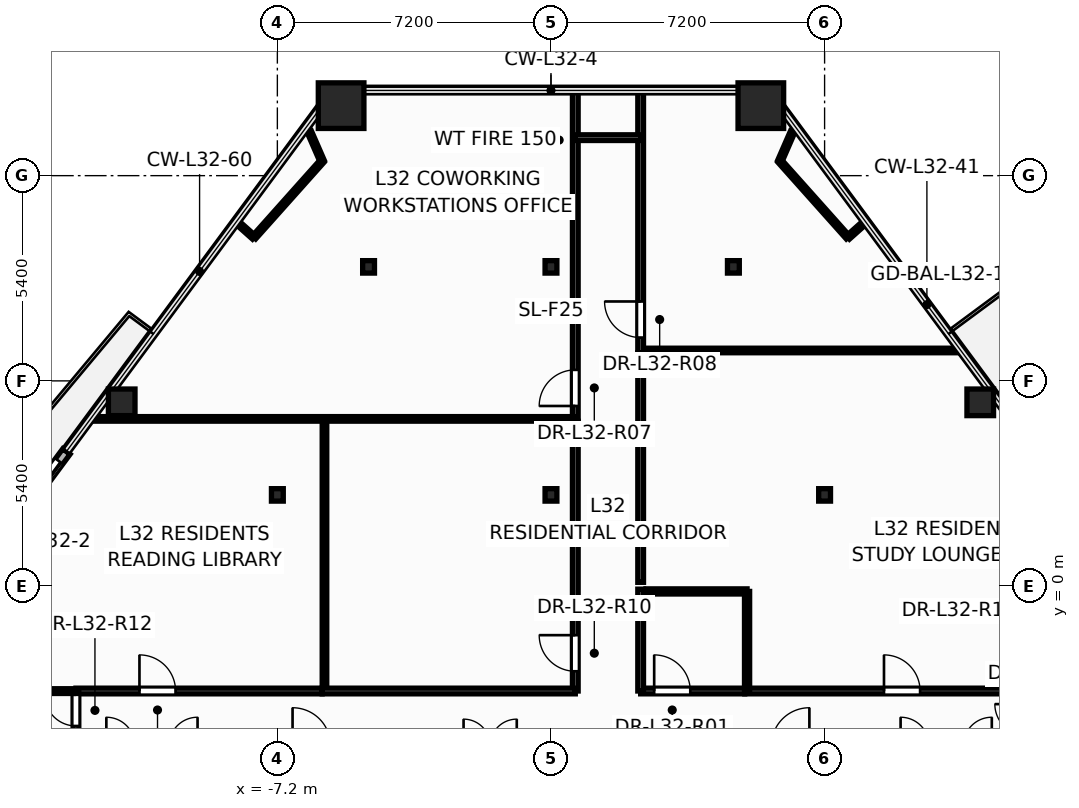
"""IFC4 building model, lengths in metres.
Left out: names, types, materials, properties, quantities, classifications, styles, units other than length and angle.
Written with IfcOpenShell. Run it as: python <this file> out.ifc"""

import sys

from ifc_helpers import new_model, si_unit, direction, frame, frame_2d, origin, origin_2d, place, context, subcontext, project, spatial, rectangle, hollow_rectangle, hollow_circle, i_section, extrude, element, fill, save


model = new_model("IFC4")
c1 = context("Model", 3, precision=1e-05, world=origin(), true_north=direction((0.0, 1.0)))
c2 = subcontext(c1, "Body", "Model", "MODEL_VIEW")
j1 = project(units=[si_unit("LENGTHUNIT", "METRE"), si_unit("PLANEANGLEUNIT", "RADIAN")], contexts=[c1])
p1 = place(None, origin())
s1 = spatial("IfcSite", under=j1, at=p1, CompositionType="ELEMENT")
p2 = place(p1, origin())
s2 = spatial("IfcBuilding", under=s1, at=p2, CompositionType="ELEMENT")
p3 = place(p2, frame((0.0, 0.0, 125.7)))
s3 = spatial("IfcBuildingStorey", under=s2, at=p3, CompositionType="ELEMENT", Elevation=125.7)
for number, where, z_axis, x_axis in (
    (1, (5.522, 12.642, 0.0), (0.0, 0.0, 1.0), (1.0, 0.0, 0.0)),
    (2, (-5.522, 12.642, 0.0), (0.0, 0.0, 1.0), (1.0, 0.0, 0.0)),
):
    element("IfcColumn", number, at=place(p3, frame(where, z_axis=z_axis, x_axis=x_axis)), inside=s3, PredefinedType="COLUMN", context=c2, shape_type="SweptSolid", body=[
        extrude(hollow_rectangle(XDim=1.2, YDim=1.2, WallThickness=0.055, at=origin_2d()), origin(), (0.0, 0.0, 1.0), 3.6),
    ])
for number, where, z_axis, x_axis in (
    (3, (11.296, 4.836, 0.0), (0.0, 0.0, 1.0), (1.0, 0.0, 0.0)),
    (4, (-11.296, 4.836, 0.0), (0.0, 0.0, 1.0), (1.0, 0.0, 0.0)),
):
    element("IfcColumn", number, at=place(p3, frame(where, z_axis=z_axis, x_axis=x_axis)), inside=s3, PredefinedType="COLUMN", context=c2, shape_type="SweptSolid", body=[
        extrude(hollow_circle(Radius=0.35, WallThickness=0.03, at=origin_2d()), origin(), (0.0, 0.0, 1.0), 3.6),
    ])
for number, where, z_axis, x_axis in (
    (5, (-7.2, 2.4, 0.0), (0.0, 0.0, 1.0), (1.0, 0.0, 0.0)),
    (6, (0.0, 2.4, 0.0), (0.0, 0.0, 1.0), (1.0, 0.0, 0.0)),
    (7, (7.2, 2.4, 0.0), (0.0, 0.0, 1.0), (1.0, 0.0, 0.0)),
    (8, (-4.8, 8.4, 0.0), (0.0, 0.0, 1.0), (1.0, 0.0, 0.0)),
    (9, (0.0, 8.4, 0.0), (0.0, 0.0, 1.0), (1.0, 0.0, 0.0)),
    (10, (4.8, 8.4, 0.0), (0.0, 0.0, 1.0), (1.0, 0.0, 0.0)),
):
    element("IfcColumn", number, at=place(p3, frame(where, z_axis=z_axis, x_axis=x_axis)), inside=s3, PredefinedType="COLUMN", context=c2, shape_type="SweptSolid", body=[
        extrude(i_section(OverallWidth=0.311, OverallDepth=0.327, WebThickness=0.016, FlangeThickness=0.025, at=origin_2d()), origin(), (0.0, 0.0, 1.0), 3.6),
    ])
p4 = place(p3, frame((-12.751, 3.541, -0.015), z_axis=(0.0, 0.0, 1.0), x_axis=(-0.594638042479, -0.80399353134, 0.0)))
e11 = element("IfcWall", 11, at=p4, inside=s3, PredefinedType="STANDARD", context=c2, shape_type="SweptSolid", body=[
    extrude(rectangle(XDim=2.14, YDim=0.24, at=frame_2d((1.07, 0.0))), origin(), (0.0, 0.0, 1.0), 2.807),
])
p5 = place(p4, frame((0.32, 0.0, 0.015)))
e12 = element("IfcOpeningElement", 12, at=p5, cuts=e11, PredefinedType="OPENING", context=c2, shape_type="SweptSolid", body=[
    extrude(rectangle(XDim=1.506, YDim=2.204, at=frame_2d((0.75, 1.102))), frame((0.0, 0.13, 0.0), z_axis=(0.0, -1.0, 0.0), x_axis=(1.0, 0.0, 0.0)), (0.0, 0.0, 1.0), 0.26),
])
p6 = place(p3, frame((0.64, 4.34, 0.0), z_axis=(0.0, 0.0, 1.0), x_axis=(0.0, 1.0, 0.0)))
e13 = element("IfcWall", 13, at=p6, inside=s3, PredefinedType="PARTITIONING", context=c2, shape_type="SweptSolid", body=[
    extrude(rectangle(XDim=8.702, YDim=0.15, at=frame_2d((4.351, 0.0))), origin(), (0.0, 0.0, 1.0), 2.325),
])
p7 = place(p6, frame((0.4, 0.0, 0.0)))
e14 = element("IfcOpeningElement", 14, at=p7, cuts=e13, PredefinedType="OPENING", context=c2, shape_type="SweptSolid", body=[
    extrude(rectangle(XDim=0.956, YDim=2.104, at=frame_2d((0.475, 1.052))), frame((0.0, 0.085, 0.0), z_axis=(0.0, -1.0, 0.0), x_axis=(1.0, 0.0, 0.0)), (0.0, 0.0, 1.0), 0.17),
])
p8 = place(p3, frame((2.36, 6.2, 0.0), z_axis=(0.0, 0.0, 1.0), x_axis=(1.0, 0.0, 0.0)))
e15 = element("IfcWall", 15, at=p8, inside=s3, PredefinedType="PARTITIONING", context=c2, shape_type="SweptSolid", body=[
    extrude(rectangle(XDim=8.424, YDim=0.12, at=frame_2d((4.212, 0.0))), origin(), (0.0, 0.0, 1.0), 2.325),
])
p9 = place(p3, frame((5.1, -2.76, 0.0), z_axis=(0.0, 0.0, 1.0), x_axis=(1.0, 0.0, 0.0)))
e16 = element("IfcWall", 16, at=p9, inside=s3, PredefinedType="PARTITIONING", context=c2, shape_type="SweptSolid", body=[
    extrude(rectangle(XDim=7.4, YDim=0.15, at=frame_2d((3.7, 0.0))), origin(), (0.0, 0.0, 1.0), 2.325),
])
p10 = place(p9, frame((3.663, 0.0, 0.0)))
e17 = element("IfcOpeningElement", 17, at=p10, cuts=e16, PredefinedType="OPENING", context=c2, shape_type="SweptSolid", body=[
    extrude(rectangle(XDim=0.956, YDim=2.104, at=frame_2d((0.475, 1.052))), frame((0.0, 0.085, 0.0), z_axis=(0.0, -1.0, 0.0), x_axis=(1.0, 0.0, 0.0)), (0.0, 0.0, 1.0), 0.17),
])
p11 = place(p3, frame((0.64, -2.76, 0.0), z_axis=(0.0, 0.0, 1.0), x_axis=(0.0, 1.0, 0.0)))
e18 = element("IfcWall", 18, at=p11, inside=s3, PredefinedType="PARTITIONING", context=c2, shape_type="SweptSolid", body=[
    extrude(rectangle(XDim=7.098, YDim=0.15, at=frame_2d((3.549, 0.0))), origin(), (0.0, 0.0, 1.0), 2.325),
])
p12 = place(p11, frame((0.519, 0.0, 0.0)))
e19 = element("IfcOpeningElement", 19, at=p12, cuts=e18, PredefinedType="OPENING", context=c2, shape_type="SweptSolid", body=[
    extrude(rectangle(XDim=0.956, YDim=2.104, at=frame_2d((0.475, 1.052))), frame((0.0, 0.085, 0.0), z_axis=(0.0, -1.0, 0.0), x_axis=(1.0, 0.0, 0.0)), (0.0, 0.0, 1.0), 0.17),
])
p13 = place(p3, frame((-5.96, -2.76, 0.0), z_axis=(0.0, 0.0, 1.0), x_axis=(0.0, 1.0, 0.0)))
e20 = element("IfcWall", 20, at=p13, inside=s3, PredefinedType="PARTITIONING", context=c2, shape_type="SweptSolid", body=[
    extrude(rectangle(XDim=7.16, YDim=0.12, at=frame_2d((3.58, 0.0))), origin(), (0.0, 0.0, 1.0), 2.325),
])
p14 = place(p3, frame((2.36, 6.14, 0.0), z_axis=(0.0, 0.0, 1.0), x_axis=(0.0, 1.0, 0.0)))
e21 = element("IfcWall", 21, at=p14, inside=s3, PredefinedType="PARTITIONING", context=c2, shape_type="SweptSolid", body=[
    extrude(rectangle(XDim=6.902, YDim=0.15, at=frame_2d((3.451, 0.0))), origin(), (0.0, 0.0, 1.0), 2.325),
])
p15 = place(p14, frame((0.399, 0.0, 0.0)))
e22 = element("IfcOpeningElement", 22, at=p15, cuts=e21, PredefinedType="OPENING", context=c2, shape_type="SweptSolid", body=[
    extrude(rectangle(XDim=0.956, YDim=2.104, at=frame_2d((0.475, 1.052))), frame((0.0, 0.085, 0.0), z_axis=(0.0, -1.0, 0.0), x_axis=(1.0, 0.0, 0.0)), (0.0, 0.0, 1.0), 0.17),
])
p16 = place(p3, frame((-6.02, -2.76, 0.0), z_axis=(0.0, 0.0, 1.0), x_axis=(1.0, 0.0, 0.0)))
e23 = element("IfcWall", 23, at=p16, inside=s3, PredefinedType="PARTITIONING", context=c2, shape_type="SweptSolid", body=[
    extrude(rectangle(XDim=6.66, YDim=0.15, at=frame_2d((3.33, 0.0))), origin(), (0.0, 0.0, 1.0), 2.325),
])
p17 = place(p3, frame((-12.116, 4.4, 0.0), z_axis=(0.0, 0.0, 1.0), x_axis=(1.0, 0.0, 0.0)))
e24 = element("IfcWall", 24, at=p17, inside=s3, PredefinedType="PARTITIONING", context=c2, shape_type="SweptSolid", body=[
    extrude(rectangle(XDim=12.756, YDim=0.12, at=frame_2d((6.378, 0.0))), origin(), (0.0, 0.0, 1.0), 2.325),
])
p18 = place(p3, frame((-12.5, -2.76, 0.0), z_axis=(0.0, 0.0, 1.0), x_axis=(1.0, 0.0, 0.0)))
e25 = element("IfcWall", 25, at=p18, inside=s3, PredefinedType="PARTITIONING", context=c2, shape_type="SweptSolid", body=[
    extrude(rectangle(XDim=6.478, YDim=0.15, at=frame_2d((3.239, 0.0))), origin(), (0.0, 0.0, 1.0), 2.325),
])
p19 = place(p18, frame((1.671, 0.0, 0.0)))
e26 = element("IfcOpeningElement", 26, at=p19, cuts=e25, PredefinedType="OPENING", context=c2, shape_type="SweptSolid", body=[
    extrude(rectangle(XDim=0.956, YDim=2.104, at=frame_2d((0.475, 1.052))), frame((0.0, 0.085, 0.0), z_axis=(0.0, -1.0, 0.0), x_axis=(1.0, 0.0, 0.0)), (0.0, 0.0, 1.0), 0.17),
])
p20 = place(p3, frame((2.36, 0.1, 0.0), z_axis=(0.0, 0.0, 1.0), x_axis=(0.0, 1.0, 0.0)))
e27 = element("IfcWall", 27, at=p20, inside=s3, PredefinedType="PARTITIONING", context=c2, shape_type="SweptSolid", body=[
    extrude(rectangle(XDim=6.038, YDim=0.15, at=frame_2d((3.019, 0.0))), origin(), (0.0, 0.0, 1.0), 2.325),
])
p21 = place(p3, frame((-17.411, -2.76, 0.0), z_axis=(0.0, 0.0, 1.0), x_axis=(1.0, 0.0, 0.0)))
e28 = element("IfcWall", 28, at=p21, inside=s3, PredefinedType="PARTITIONING", context=c2, shape_type="SweptSolid", body=[
    extrude(rectangle(XDim=4.971, YDim=0.12, at=frame_2d((2.486, 0.0))), origin(), (0.0, 0.0, 1.0), 2.792),
])
p22 = place(p3, frame((2.36, -2.76, 0.0), z_axis=(0.0, 0.0, 1.0), x_axis=(1.0, 0.0, 0.0)))
e29 = element("IfcWall", 29, at=p22, inside=s3, PredefinedType="PARTITIONING", context=c2, shape_type="SweptSolid", body=[
    extrude(rectangle(XDim=2.738, YDim=0.15, at=frame_2d((1.369, 0.0))), origin(), (0.0, 0.0, 1.0), 2.919),
])
p23 = place(p22, frame((0.356, 0.0, 0.0)))
e30 = element("IfcOpeningElement", 30, at=p23, cuts=e29, PredefinedType="OPENING", context=c2, shape_type="SweptSolid", body=[
    extrude(rectangle(XDim=0.956, YDim=2.104, at=frame_2d((0.475, 1.052))), frame((0.0, 0.085, 0.0), z_axis=(0.0, -1.0, 0.0), x_axis=(1.0, 0.0, 0.0)), (0.0, 0.0, 1.0), 0.17),
])
for number, where, z_axis, x_axis in (
    (31, (-6.022, 11.184, 0.0), (0.0, 0.0, 1.0), (-0.666, -0.746, 0.0)),
    (32, (7.815, 9.175, 0.0), (0.0, 0.0, 1.0), (-0.666, 0.746, 0.0)),
):
    element("IfcWall", number, at=place(p3, frame(where, z_axis=z_axis, x_axis=x_axis)), inside=s3, PredefinedType="PARTITIONING", context=c2, shape_type="SweptSolid", body=[
        extrude(rectangle(XDim=2.693, YDim=0.12, at=frame_2d((1.346, 0.0))), origin(), (0.0, 0.0, 1.0), 3.35),
    ])
p24 = place(p3, frame((2.36, -2.76, 0.0), z_axis=(0.0, 0.0, 1.0), x_axis=(0.0, 1.0, 0.0)))
e33 = element("IfcWall", 33, at=p24, inside=s3, PredefinedType="PARTITIONING", context=c2, shape_type="SweptSolid", body=[
    extrude(rectangle(XDim=2.68, YDim=0.15, at=frame_2d((1.34, 0.0))), origin(), (0.0, 0.0, 1.0), 3.35),
])
p25 = place(p3, frame((5.16, -2.76, 0.0), z_axis=(0.0, 0.0, 1.0), x_axis=(0.0, 1.0, 0.0)))
e34 = element("IfcWall", 34, at=p25, inside=s3, PredefinedType="PARTITIONING", context=c2, shape_type="SweptSolid", body=[
    extrude(rectangle(XDim=2.62, YDim=0.135, at=frame_2d((1.31, 0.0))), origin(), (0.0, 0.0, 1.0), 3.35),
])
p26 = place(p3, frame((-12.5, -4.24, 0.0), z_axis=(0.0, 0.0, 1.0), x_axis=(0.0, 1.0, 0.0)))
e35 = element("IfcWall", 35, at=p26, inside=s3, PredefinedType="PARTITIONING", context=c2, shape_type="SweptSolid", body=[
    extrude(rectangle(XDim=1.48, YDim=0.15, at=frame_2d((0.74, 0.0))), origin(), (0.0, 0.0, 1.0), 2.325),
])
p27 = place(p26, frame((0.56, 0.0, 0.0)))
e36 = element("IfcOpeningElement", 36, at=p27, cuts=e35, PredefinedType="OPENING", context=c2, shape_type="SweptSolid", body=[
    extrude(rectangle(XDim=0.826, YDim=2.104, at=frame_2d((0.41, 1.052))), frame((0.0, 0.085, 0.0), z_axis=(0.0, -1.0, 0.0), x_axis=(1.0, 0.0, 0.0)), (0.0, 0.0, 1.0), 0.17),
])
p28 = place(p3, frame((0.64, 11.8, 0.0), z_axis=(0.0, 0.0, 1.0), x_axis=(1.0, 0.0, 0.0)))
e37 = element("IfcWall", 37, at=p28, inside=s3, PredefinedType="PARTITIONING", context=c2, shape_type="SweptSolid", body=[
    extrude(rectangle(XDim=1.72, YDim=0.15, at=frame_2d((0.86, 0.0))), origin(), (0.0, 0.0, 1.0), 3.35),
])
for number, where, z_axis, x_axis in (
    (38, (-6.358, 11.953, 0.0), (0.0, 0.0, 1.0), (0.4, -0.917, 0.0)),
    (39, (6.022, 11.184, 0.0), (0.0, 0.0, 1.0), (0.4, 0.917, 0.0)),
):
    element("IfcWall", number, at=place(p3, frame(where, z_axis=z_axis, x_axis=x_axis)), inside=s3, PredefinedType="PARTITIONING", context=c2, shape_type="SweptSolid", body=[
        extrude(rectangle(XDim=0.84, YDim=0.12, at=frame_2d((0.42, 0.0))), origin(), (0.0, 0.0, 1.0), 2.792),
    ])
for number, where, z_axis, x_axis in (
    (40, (-7.815, 9.175, 0.0), (0.0, 0.0, 1.0), (-0.746, 0.666, 0.0)),
    (41, (8.271, 9.582, 0.0), (0.0, 0.0, 1.0), (-0.746, -0.666, 0.0)),
):
    element("IfcWall", number, at=place(p3, frame(where, z_axis=z_axis, x_axis=x_axis)), inside=s3, PredefinedType="PARTITIONING", context=c2, shape_type="SweptSolid", body=[
        extrude(rectangle(XDim=0.611, YDim=0.12, at=frame_2d((0.306, 0.0))), origin(), (0.0, 0.0, 1.0), 2.792),
    ])
p29 = place(p3, frame((2.5, -0.14, 0.0), z_axis=(0.0, 0.0, 1.0), x_axis=(1.0, 0.0, 0.0)))
e42 = element("IfcWall", 42, at=p29, inside=s3, PredefinedType="PARTITIONING", context=c2, shape_type="SweptSolid", body=[
    extrude(rectangle(XDim=2.66, YDim=0.135, at=frame_2d((1.33, 0.0))), origin(), (0.0, 0.0, 1.0), 2.919),
])
p30 = place(p5, origin())
e43 = element("IfcDoor", 43, at=p30, inside=s3, OperationType="SLIDING_TO_RIGHT", PredefinedType="DOOR", context=c2, shape_type="SweptSolid", body=[
    extrude(rectangle(XDim=1.5, YDim=2.2, at=frame_2d((0.75, 1.1))), frame((0.0, 0.025, 0.0), z_axis=(0.0, -1.0, 0.0), x_axis=(1.0, 0.0, 0.0)), (0.0, 0.0, 1.0), 0.05),
])
fill(e12, e43)
p31 = place(p23, origin())
e44 = element("IfcDoor", 44, at=p31, inside=s3, OperationType="SINGLE_SWING_LEFT", PredefinedType="DOOR", context=c2, shape_type="SweptSolid", body=[
    extrude(rectangle(XDim=0.95, YDim=2.1, at=frame_2d((0.475, 1.05))), frame((0.0, 0.025, 0.0), z_axis=(0.0, -1.0, 0.0), x_axis=(1.0, 0.0, 0.0)), (0.0, 0.0, 1.0), 0.05),
])
fill(e30, e44)
p32 = place(p7, origin())
e45 = element("IfcDoor", 45, at=p32, inside=s3, OperationType="SINGLE_SWING_LEFT", PredefinedType="DOOR", context=c2, shape_type="SweptSolid", body=[
    extrude(rectangle(XDim=0.95, YDim=2.1, at=frame_2d((0.475, 1.05))), frame((0.0, 0.025, 0.0), z_axis=(0.0, -1.0, 0.0), x_axis=(1.0, 0.0, 0.0)), (0.0, 0.0, 1.0), 0.05),
])
fill(e14, e45)
p33 = place(p15, origin())
e46 = element("IfcDoor", 46, at=p33, inside=s3, OperationType="SINGLE_SWING_RIGHT", PredefinedType="DOOR", context=c2, shape_type="SweptSolid", body=[
    extrude(rectangle(XDim=0.95, YDim=2.1, at=frame_2d((0.475, 1.05))), frame((0.0, 0.025, 0.0), z_axis=(0.0, -1.0, 0.0), x_axis=(1.0, 0.0, 0.0)), (0.0, 0.0, 1.0), 0.05),
])
fill(e22, e46)
p34 = place(p19, origin())
e47 = element("IfcDoor", 47, at=p34, inside=s3, OperationType="SINGLE_SWING_LEFT", PredefinedType="DOOR", context=c2, shape_type="SweptSolid", body=[
    extrude(rectangle(XDim=0.95, YDim=2.1, at=frame_2d((0.475, 1.05))), frame((0.0, 0.025, 0.0), z_axis=(0.0, -1.0, 0.0), x_axis=(1.0, 0.0, 0.0)), (0.0, 0.0, 1.0), 0.05),
])
fill(e26, e47)
p35 = place(p12, origin())
e48 = element("IfcDoor", 48, at=p35, inside=s3, OperationType="SINGLE_SWING_RIGHT", PredefinedType="DOOR", context=c2, shape_type="SweptSolid", body=[
    extrude(rectangle(XDim=0.95, YDim=2.1, at=frame_2d((0.475, 1.05))), frame((0.0, 0.025, 0.0), z_axis=(0.0, -1.0, 0.0), x_axis=(1.0, 0.0, 0.0)), (0.0, 0.0, 1.0), 0.05),
])
fill(e19, e48)
p36 = place(p27, origin())
e49 = element("IfcDoor", 49, at=p36, inside=s3, OperationType="SINGLE_SWING_RIGHT", PredefinedType="DOOR", context=c2, shape_type="SweptSolid", body=[
    extrude(rectangle(XDim=0.82, YDim=2.1, at=frame_2d((0.41, 1.05))), frame((0.0, 0.025, 0.0), z_axis=(0.0, -1.0, 0.0), x_axis=(1.0, 0.0, 0.0)), (0.0, 0.0, 1.0), 0.05),
])
fill(e36, e49)
p37 = place(p10, origin())
e50 = element("IfcDoor", 50, at=p37, inside=s3, OperationType="SINGLE_SWING_LEFT", PredefinedType="DOOR", context=c2, shape_type="SweptSolid", body=[
    extrude(rectangle(XDim=0.95, YDim=2.1, at=frame_2d((0.475, 1.05))), frame((0.0, 0.025, 0.0), z_axis=(0.0, -1.0, 0.0), x_axis=(1.0, 0.0, 0.0)), (0.0, 0.0, 1.0), 0.05),
])
fill(e17, e50)
save(model, sys.argv[1])
